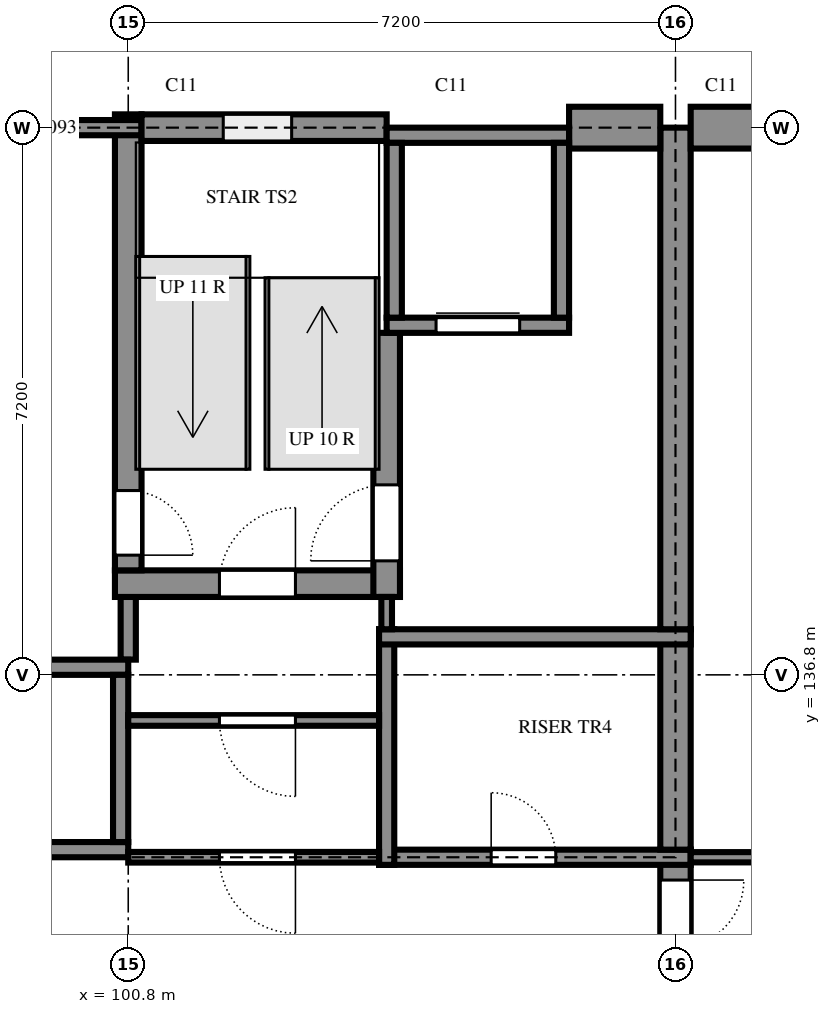
"""IFC4 building model, lengths in metres.
Left out: names, types, materials, properties, quantities, classifications, styles, units other than length and angle.
Written with IfcOpenShell. Run it as: python <this file> out.ifc"""

import sys

from ifc_helpers import new_model, si_unit, direction, frame, frame_2d, origin, origin_2d, place, context, subcontext, project, spatial, rectangle, i_section, extrude, element, fill, save


model = new_model("IFC4")
c1 = context("Model", 3, precision=1e-05, world=origin(), true_north=direction((0.0, 1.0)))
c2 = subcontext(c1, "Body", "Model", "MODEL_VIEW")
j1 = project(units=[si_unit("LENGTHUNIT", "METRE"), si_unit("PLANEANGLEUNIT", "RADIAN")], contexts=[c1])
p1 = place(None, origin())
s1 = spatial("IfcSite", under=j1, at=p1, CompositionType="ELEMENT")
p2 = place(p1, origin())
s2 = spatial("IfcBuilding", under=s1, at=p2, CompositionType="ELEMENT")
p3 = place(p2, frame((0.0, 0.0, 3.6)))
s3 = spatial("IfcBuildingStorey", under=s2, at=p3, CompositionType="ELEMENT", Elevation=3.6)
p4 = place(p3, frame((108.0, 132.0, 0.0), z_axis=(0.0, 0.0, 1.0), x_axis=(0.0, 1.0, 0.0)))
e1 = element("IfcWall", 1, at=p4, inside=s3, PredefinedType="SHEAR", context=c2, shape_type="SweptSolid", body=[
    extrude(rectangle(XDim=2.5, YDim=0.4, at=frame_2d((1.25, 0.0))), origin(), (0.0, 0.0, 1.0), 3.6),
])
p5 = place(p4, frame((0.3, 0.0, 0.0)))
e2 = element("IfcOpeningElement", 2, at=p5, cuts=e1, PredefinedType="OPENING", context=c2, shape_type="SweptSolid", body=[
    extrude(rectangle(XDim=1.8, YDim=2.1, at=frame_2d((0.9, 1.05))), frame((0.0, 0.21, 0.0), z_axis=(0.0, -1.0, 0.0), x_axis=(1.0, 0.0, 0.0)), (0.0, 0.0, 1.0), 0.42),
])
p6 = place(p3, frame((104.1, 134.4, 0.0), z_axis=(0.0, 0.0, 1.0), x_axis=(1.0, 0.0, 0.0)))
e3 = element("IfcWall", 3, at=p6, inside=s3, PredefinedType="SHEAR", context=c2, shape_type="SweptSolid", body=[
    extrude(rectangle(XDim=4.1, YDim=0.2, at=frame_2d((2.05, 0.0))), origin(), (0.0, 0.0, 1.0), 3.6),
])
p7 = place(p6, frame((1.475, 0.0, 0.0)))
e4 = element("IfcOpeningElement", 4, at=p7, cuts=e3, PredefinedType="OPENING", context=c2, shape_type="SweptSolid", body=[
    extrude(rectangle(XDim=0.85, YDim=2.1, at=frame_2d((0.425, 1.05))), frame((0.0, 0.11, 0.0), z_axis=(0.0, -1.0, 0.0), x_axis=(1.0, 0.0, 0.0)), (0.0, 0.0, 1.0), 0.22),
])
p8 = place(p3, frame((108.0, 134.5, 0.0), z_axis=(0.0, 0.0, 1.0), x_axis=(0.0, 1.0, 0.0)))
e5 = element("IfcWall", 5, at=p8, inside=s3, PredefinedType="SHEAR", context=c2, shape_type="SweptSolid", body=[
    extrude(rectangle(XDim=2.9, YDim=0.4, at=frame_2d((1.45, 0.0))), origin(), (0.0, 0.0, 1.0), 3.6),
])
p9 = place(p3, frame((100.8, 137.0, 0.0), z_axis=(0.0, 0.0, 1.0), x_axis=(0.0, 1.0, 0.0)))
e6 = element("IfcWall", 6, at=p9, inside=s3, PredefinedType="SHEAR", context=c2, shape_type="SweptSolid", body=[
    extrude(rectangle(XDim=1.175, YDim=0.2, at=frame_2d((0.587, 0.0))), origin(), (0.0, 0.0, 1.0), 3.6),
])
p10 = place(p3, frame((104.2, 137.4, 0.0), z_axis=(0.0, 0.0, 1.0), x_axis=(0.0, -1.0, 0.0)))
e7 = element("IfcWall", 7, at=p10, inside=s3, PredefinedType="SHEAR", context=c2, shape_type="SweptSolid", body=[
    extrude(rectangle(XDim=3.1, YDim=0.2, at=frame_2d((1.55, 0.0))), origin(), (0.0, 0.0, 1.0), 3.6),
])
p11 = place(p3, frame((108.2, 137.3, 0.0), z_axis=(0.0, 0.0, 1.0), x_axis=(-1.0, 0.0, 0.0)))
e8 = element("IfcWall", 8, at=p11, inside=s3, PredefinedType="SHEAR", context=c2, shape_type="SweptSolid", body=[
    extrude(rectangle(XDim=4.1, YDim=0.2, at=frame_2d((2.05, 0.0))), origin(), (0.0, 0.0, 1.0), 3.6),
])
p12 = place(p3, frame((108.0, 137.4, 0.0), z_axis=(0.0, 0.0, 1.0), x_axis=(0.0, 1.0, 0.0)))
e9 = element("IfcWall", 9, at=p12, inside=s3, PredefinedType="SHEAR", context=c2, shape_type="SweptSolid", body=[
    extrude(rectangle(XDim=6.6, YDim=0.4, at=frame_2d((3.3, 0.0))), origin(), (0.0, 0.0, 1.0), 3.6),
])
p13 = place(p3, frame((100.625, 138.0, 0.0), z_axis=(0.0, 0.0, 1.0), x_axis=(1.0, 0.0, 0.0)))
e10 = element("IfcWall", 10, at=p13, inside=s3, PredefinedType="SHEAR", context=c2, shape_type="SweptSolid", body=[
    extrude(rectangle(XDim=3.75, YDim=0.35, at=frame_2d((1.875, 0.0))), origin(), (0.0, 0.0, 1.0), 3.6),
])
p14 = place(p13, frame((1.375, 0.0, 0.0)))
e11 = element("IfcOpeningElement", 11, at=p14, cuts=e10, PredefinedType="OPENING", context=c2, shape_type="SweptSolid", body=[
    extrude(rectangle(XDim=1.0, YDim=2.1, at=frame_2d((0.5, 1.05))), frame((0.0, 0.185, 0.0), z_axis=(0.0, -1.0, 0.0), x_axis=(1.0, 0.0, 0.0)), (0.0, 0.0, 1.0), 0.37),
])
p15 = place(p3, frame((104.2, 137.825, 0.0), z_axis=(0.0, 0.0, 1.0), x_axis=(0.0, 1.0, 0.0)))
e12 = element("IfcWall", 12, at=p15, inside=s3, PredefinedType="SHEAR", context=c2, shape_type="SweptSolid", body=[
    extrude(rectangle(XDim=3.475, YDim=0.35, at=frame_2d((1.738, 0.0))), origin(), (0.0, 0.0, 1.0), 3.6),
])
p16 = place(p15, frame((0.475, 0.0, 0.0)))
e13 = element("IfcOpeningElement", 13, at=p16, cuts=e12, PredefinedType="OPENING", context=c2, shape_type="SweptSolid", body=[
    extrude(rectangle(XDim=1.0, YDim=2.1, at=frame_2d((0.5, 1.05))), frame((0.0, 0.185, 0.0), z_axis=(0.0, -1.0, 0.0), x_axis=(1.0, 0.0, 0.0)), (0.0, 0.0, 1.0), 0.37),
])
p17 = place(p3, frame((100.8, 144.175, 0.0), z_axis=(0.0, 0.0, 1.0), x_axis=(0.0, -1.0, 0.0)))
e14 = element("IfcWall", 14, at=p17, inside=s3, PredefinedType="SHEAR", context=c2, shape_type="SweptSolid", body=[
    extrude(rectangle(XDim=6.0, YDim=0.35, at=frame_2d((3.0, 0.0))), origin(), (0.0, 0.0, 1.0), 3.6),
])
p18 = place(p17, frame((4.95, 0.0, 0.0)))
e15 = element("IfcOpeningElement", 15, at=p18, cuts=e14, PredefinedType="OPENING", context=c2, shape_type="SweptSolid", body=[
    extrude(rectangle(XDim=0.85, YDim=2.1, at=frame_2d((0.425, 1.05))), frame((0.0, 0.185, 0.0), z_axis=(0.0, -1.0, 0.0), x_axis=(1.0, 0.0, 0.0)), (0.0, 0.0, 1.0), 0.37),
])
p19 = place(p3, frame((100.975, 144.0, 0.0), z_axis=(0.0, 0.0, 1.0), x_axis=(-1.0, 0.0, 0.0)))
e16 = element("IfcWall", 16, at=p19, inside=s3, PredefinedType="SHEAR", context=c2, shape_type="SweptSolid", body=[
    extrude(rectangle(XDim=7.575, YDim=0.2, at=frame_2d((3.788, 0.0))), origin(), (0.0, 0.0, 1.0), 3.6),
])
p20 = place(p3, frame((104.2, 144.0, 0.0), z_axis=(0.0, 0.0, 1.0), x_axis=(-1.0, 0.0, 0.0)))
e17 = element("IfcWall", 17, at=p20, inside=s3, PredefinedType="SHEAR", context=c2, shape_type="SweptSolid", body=[
    extrude(rectangle(XDim=3.225, YDim=0.35, at=frame_2d((1.612, 0.0))), origin(), (0.0, 0.0, 1.0), 3.6),
])
p21 = place(p20, frame((1.25, 0.0, 0.6)))
e18 = element("IfcOpeningElement", 18, at=p21, cuts=e17, PredefinedType="OPENING", context=c2, shape_type="SweptSolid", body=[
    extrude(rectangle(XDim=0.9, YDim=2.1, at=frame_2d((0.45, 1.05))), frame((0.0, 0.185, 0.0), z_axis=(0.0, -1.0, 0.0), x_axis=(1.0, 0.0, 0.0)), (0.0, 0.0, 1.0), 0.37),
])
p22 = place(p3, frame((106.6, 144.0, 0.0), z_axis=(0.0, 0.0, 1.0), x_axis=(1.0, 0.0, 0.0)))
e19 = element("IfcWall", 19, at=p22, inside=s3, PredefinedType="SOLIDWALL", context=c2, shape_type="SweptSolid", body=[
    extrude(rectangle(XDim=1.2, YDim=0.55, at=frame_2d((0.6, 0.0))), origin(), (0.0, 0.0, 1.0), 3.6),
])
p23 = place(p3, frame((108.2, 144.0, 0.0), z_axis=(0.0, 0.0, 1.0), x_axis=(1.0, 0.0, 0.0)))
e20 = element("IfcWall", 20, at=p23, inside=s3, PredefinedType="SOLIDWALL", context=c2, shape_type="SweptSolid", body=[
    extrude(rectangle(XDim=25.05, YDim=0.55, at=frame_2d((12.525, 0.0))), origin(), (0.0, 0.0, 1.0), 3.6),
])
for number, where, z_axis, x_axis in (
    (21, (98.4, 134.5, 0.0), (0.0, 0.0, 1.0), (1.0, 0.0, 0.0)),
    (22, (98.4, 136.9, 0.0), (0.0, 0.0, 1.0), (1.0, 0.0, 0.0)),
):
    element("IfcWall", number, at=place(p3, frame(where, z_axis=z_axis, x_axis=x_axis)), inside=s3, PredefinedType="SHEAR", context=c2, shape_type="SweptSolid", body=[
        extrude(rectangle(XDim=2.4, YDim=0.2, at=frame_2d((1.2, 0.0))), origin(), (0.0, 0.0, 1.0), 3.6),
    ])
p24 = place(p3, frame((100.7, 134.6, 0.0), z_axis=(0.0, 0.0, 1.0), x_axis=(0.0, 1.0, 0.0)))
e23 = element("IfcWall", 23, at=p24, inside=s3, PredefinedType="SHEAR", context=c2, shape_type="SweptSolid", body=[
    extrude(rectangle(XDim=2.2, YDim=0.2, at=frame_2d((1.1, 0.0))), origin(), (0.0, 0.0, 1.0), 3.6),
])
p25 = place(p3, frame((104.2, 141.4, 0.0), z_axis=(0.0, 0.0, 1.0), x_axis=(1.0, 0.0, 0.0)))
e24 = element("IfcWall", 24, at=p25, inside=s3, PredefinedType="SHEAR", context=c2, shape_type="SweptSolid", body=[
    extrude(rectangle(XDim=2.4, YDim=0.2, at=frame_2d((1.2, 0.0))), origin(), (0.0, 0.0, 1.0), 3.6),
])
p26 = place(p25, frame((0.65, 0.0, 0.0)))
e25 = element("IfcOpeningElement", 25, at=p26, cuts=e24, PredefinedType="OPENING", context=c2, shape_type="SweptSolid", body=[
    extrude(rectangle(XDim=1.1, YDim=2.1, at=frame_2d((0.55, 1.05))), frame((0.0, 0.11, 0.0), z_axis=(0.0, -1.0, 0.0), x_axis=(1.0, 0.0, 0.0)), (0.0, 0.0, 1.0), 0.22),
])
p27 = place(p3, frame((104.2, 143.9, 0.0), z_axis=(0.0, 0.0, 1.0), x_axis=(1.0, 0.0, 0.0)))
e26 = element("IfcWall", 26, at=p27, inside=s3, PredefinedType="SHEAR", context=c2, shape_type="SweptSolid", body=[
    extrude(rectangle(XDim=2.4, YDim=0.2, at=frame_2d((1.2, 0.0))), origin(), (0.0, 0.0, 1.0), 3.6),
])
for number, where, z_axis, x_axis in (
    (27, (104.3, 141.5, 0.0), (0.0, 0.0, 1.0), (0.0, 1.0, 0.0)),
    (28, (106.5, 141.5, 0.0), (0.0, 0.0, 1.0), (0.0, 1.0, 0.0)),
):
    element("IfcWall", number, at=place(p3, frame(where, z_axis=z_axis, x_axis=x_axis)), inside=s3, PredefinedType="SHEAR", context=c2, shape_type="SweptSolid", body=[
        extrude(rectangle(XDim=2.3, YDim=0.2, at=frame_2d((1.15, 0.0))), origin(), (0.0, 0.0, 1.0), 3.6),
    ])
for number, where, z_axis, x_axis in (
    (29, (101.5, 144.55, 0.0), (0.0, 0.0, 1.0), (1.0, 0.0, 0.0)),
    (30, (105.05, 144.55, 0.0), (0.0, 0.0, 1.0), (1.0, 0.0, 0.0)),
    (31, (108.6, 144.55, 0.0), (0.0, 0.0, 1.0), (1.0, 0.0, 0.0)),
):
    element("IfcColumn", number, at=place(p3, frame(where, z_axis=z_axis, x_axis=x_axis)), inside=s3, PredefinedType="COLUMN", context=c2, shape_type="SweptSolid", body=[
        extrude(i_section(OverallWidth=0.2, OverallDepth=0.2, WebThickness=0.009, FlangeThickness=0.015, FilletRadius=0.018, at=origin_2d()), origin(), (0.0, 0.0, 1.0), 3.6),
    ])
p28 = place(p3, frame((100.8, 134.4, 0.0), z_axis=(0.0, 0.0, 1.0), x_axis=(1.0, 0.0, 0.0)))
e32 = element("IfcWall", 32, at=p28, inside=s3, PredefinedType="PARTITIONING", context=c2, shape_type="SweptSolid", body=[
    extrude(rectangle(XDim=3.3, YDim=0.14, at=frame_2d((1.65, 0.0))), origin(), (0.0, 0.0, 1.0), 3.42),
])
p29 = place(p28, frame((1.2, 0.0, 0.0)))
e33 = element("IfcOpeningElement", 33, at=p29, cuts=e32, PredefinedType="OPENING", context=c2, shape_type="SweptSolid", body=[
    extrude(rectangle(XDim=1.0, YDim=2.1, at=frame_2d((0.5, 1.05))), frame((0.0, 0.08, 0.0), z_axis=(0.0, -1.0, 0.0), x_axis=(1.0, 0.0, 0.0)), (0.0, 0.0, 1.0), 0.16),
])
p30 = place(p3, frame((108.2, 134.4, 0.0), z_axis=(0.0, 0.0, 1.0), x_axis=(1.0, 0.0, 0.0)))
e34 = element("IfcWall", 34, at=p30, inside=s3, PredefinedType="PARTITIONING", context=c2, shape_type="SweptSolid", body=[
    extrude(rectangle(XDim=28.45, YDim=0.135, at=frame_2d((14.225, 0.0))), origin(), (0.0, 0.0, 1.0), 3.12),
])
p31 = place(p30, frame((2.9, 0.0, 0.0)))
e35 = element("IfcOpeningElement", 35, at=p31, cuts=e34, PredefinedType="OPENING", context=c2, shape_type="SweptSolid", body=[
    extrude(rectangle(XDim=1.0, YDim=2.4, at=frame_2d((0.5, 1.2))), frame((0.0, 0.077, 0.0), z_axis=(0.0, -1.0, 0.0), x_axis=(1.0, 0.0, 0.0)), (0.0, 0.0, 1.0), 0.155),
])
p32 = place(p30, frame((10.1, 0.0, 0.0)))
e36 = element("IfcOpeningElement", 36, at=p32, cuts=e34, PredefinedType="OPENING", context=c2, shape_type="SweptSolid", body=[
    extrude(rectangle(XDim=1.0, YDim=2.4, at=frame_2d((0.5, 1.2))), frame((0.0, 0.077, 0.0), z_axis=(0.0, -1.0, 0.0), x_axis=(1.0, 0.0, 0.0)), (0.0, 0.0, 1.0), 0.155),
])
p33 = place(p30, frame((17.3, 0.0, 0.0)))
e37 = element("IfcOpeningElement", 37, at=p33, cuts=e34, PredefinedType="OPENING", context=c2, shape_type="SweptSolid", body=[
    extrude(rectangle(XDim=1.0, YDim=2.4, at=frame_2d((0.5, 1.2))), frame((0.0, 0.077, 0.0), z_axis=(0.0, -1.0, 0.0), x_axis=(1.0, 0.0, 0.0)), (0.0, 0.0, 1.0), 0.155),
])
p34 = place(p3, frame((100.8, 136.2, 0.0), z_axis=(0.0, 0.0, 1.0), x_axis=(1.0, 0.0, 0.0)))
e38 = element("IfcWall", 38, at=p34, inside=s3, PredefinedType="PARTITIONING", context=c2, shape_type="SweptSolid", body=[
    extrude(rectangle(XDim=3.3, YDim=0.14, at=frame_2d((1.65, 0.0))), origin(), (0.0, 0.0, 1.0), 3.42),
])
p35 = place(p34, frame((1.2, 0.0, 0.0)))
e39 = element("IfcOpeningElement", 39, at=p35, cuts=e38, PredefinedType="OPENING", context=c2, shape_type="SweptSolid", body=[
    extrude(rectangle(XDim=1.0, YDim=2.1, at=frame_2d((0.5, 1.05))), frame((0.0, 0.08, 0.0), z_axis=(0.0, -1.0, 0.0), x_axis=(1.0, 0.0, 0.0)), (0.0, 0.0, 1.0), 0.16),
])
p36 = place(p3, frame((104.2, 137.4, 0.0), z_axis=(0.0, 0.0, 1.0), x_axis=(0.0, 1.0, 0.0)))
e40 = element("IfcWall", 40, at=p36, inside=s3, PredefinedType="PARTITIONING", context=c2, shape_type="SweptSolid", body=[
    extrude(rectangle(XDim=0.425, YDim=0.14, at=frame_2d((0.212, 0.0))), origin(), (0.0, 0.0, 1.0), 3.42),
])
p37 = place(p21, origin())
e41 = element("IfcWindow", 41, at=p37, inside=s3, PartitioningType="SINGLE_PANEL", PredefinedType="WINDOW", context=c2, shape_type="SweptSolid", body=[
    extrude(rectangle(XDim=0.9, YDim=2.1, at=frame_2d((0.45, 1.05))), frame((0.0, 0.03, 0.0), z_axis=(0.0, -1.0, 0.0), x_axis=(1.0, 0.0, 0.0)), (0.0, 0.0, 1.0), 0.06),
])
fill(e18, e41)
p38 = place(p26, origin())
e42 = element("IfcDoor", 42, at=p38, inside=s3, OperationType="SLIDING_TO_LEFT", PredefinedType="DOOR", context=c2, shape_type="SweptSolid", body=[
    extrude(rectangle(XDim=1.1, YDim=2.1, at=frame_2d((0.55, 1.05))), frame((0.0, 0.025, 0.0), z_axis=(0.0, -1.0, 0.0), x_axis=(1.0, 0.0, 0.0)), (0.0, 0.0, 1.0), 0.05),
])
fill(e25, e42)
p39 = place(p29, frame((1.0, 0.0, 0.0), z_axis=(0.0, 0.0, 1.0), x_axis=(-1.0, 0.0, 0.0)))
e43 = element("IfcDoor", 43, at=p39, inside=s3, OperationType="SINGLE_SWING_RIGHT", PredefinedType="DOOR", context=c2, shape_type="SweptSolid", body=[
    extrude(rectangle(XDim=1.0, YDim=2.1, at=frame_2d((0.5, 1.05))), frame((0.0, 0.025, 0.0), z_axis=(0.0, -1.0, 0.0), x_axis=(1.0, 0.0, 0.0)), (0.0, 0.0, 1.0), 0.05),
])
fill(e33, e43)
p40 = place(p35, frame((1.0, 0.0, 0.0), z_axis=(0.0, 0.0, 1.0), x_axis=(-1.0, 0.0, 0.0)))
e44 = element("IfcDoor", 44, at=p40, inside=s3, OperationType="SINGLE_SWING_RIGHT", PredefinedType="DOOR", context=c2, shape_type="SweptSolid", body=[
    extrude(rectangle(XDim=1.0, YDim=2.1, at=frame_2d((0.5, 1.05))), frame((0.0, 0.025, 0.0), z_axis=(0.0, -1.0, 0.0), x_axis=(1.0, 0.0, 0.0)), (0.0, 0.0, 1.0), 0.05),
])
fill(e39, e44)
p41 = place(p7, origin())
e45 = element("IfcDoor", 45, at=p41, inside=s3, OperationType="SINGLE_SWING_RIGHT", PredefinedType="DOOR", context=c2, shape_type="SweptSolid", body=[
    extrude(rectangle(XDim=0.85, YDim=2.1, at=frame_2d((0.425, 1.05))), frame((0.0, 0.025, 0.0), z_axis=(0.0, -1.0, 0.0), x_axis=(1.0, 0.0, 0.0)), (0.0, 0.0, 1.0), 0.05),
])
fill(e4, e45)
p42 = place(p14, origin())
e46 = element("IfcDoor", 46, at=p42, inside=s3, OperationType="SINGLE_SWING_LEFT", PredefinedType="DOOR", context=c2, shape_type="SweptSolid", body=[
    extrude(rectangle(XDim=1.0, YDim=2.1, at=frame_2d((0.5, 1.05))), frame((0.0, 0.025, 0.0), z_axis=(0.0, -1.0, 0.0), x_axis=(1.0, 0.0, 0.0)), (0.0, 0.0, 1.0), 0.05),
])
fill(e11, e46)
p43 = place(p18, origin())
e47 = element("IfcDoor", 47, at=p43, inside=s3, OperationType="SINGLE_SWING_LEFT", PredefinedType="DOOR", context=c2, shape_type="SweptSolid", body=[
    extrude(rectangle(XDim=0.85, YDim=2.1, at=frame_2d((0.425, 1.05))), frame((0.0, 0.025, 0.0), z_axis=(0.0, -1.0, 0.0), x_axis=(1.0, 0.0, 0.0)), (0.0, 0.0, 1.0), 0.05),
])
fill(e15, e47)
p44 = place(p16, origin())
e48 = element("IfcDoor", 48, at=p44, inside=s3, OperationType="SINGLE_SWING_RIGHT", PredefinedType="DOOR", context=c2, shape_type="SweptSolid", body=[
    extrude(rectangle(XDim=1.0, YDim=2.1, at=frame_2d((0.5, 1.05))), frame((0.0, 0.025, 0.0), z_axis=(0.0, -1.0, 0.0), x_axis=(1.0, 0.0, 0.0)), (0.0, 0.0, 1.0), 0.05),
])
fill(e13, e48)
p45 = place(p5, frame((1.8, 0.0, 0.0), z_axis=(0.0, 0.0, 1.0), x_axis=(-1.0, 0.0, 0.0)))
e49 = element("IfcDoor", 49, at=p45, inside=s3, OperationType="DOUBLE_DOOR_SINGLE_SWING", PredefinedType="DOOR", context=c2, shape_type="SweptSolid", body=[
    extrude(rectangle(XDim=1.8, YDim=2.1, at=frame_2d((0.9, 1.05))), frame((0.0, 0.025, 0.0), z_axis=(0.0, -1.0, 0.0), x_axis=(1.0, 0.0, 0.0)), (0.0, 0.0, 1.0), 0.05),
])
fill(e2, e49)
save(model, sys.argv[1])
